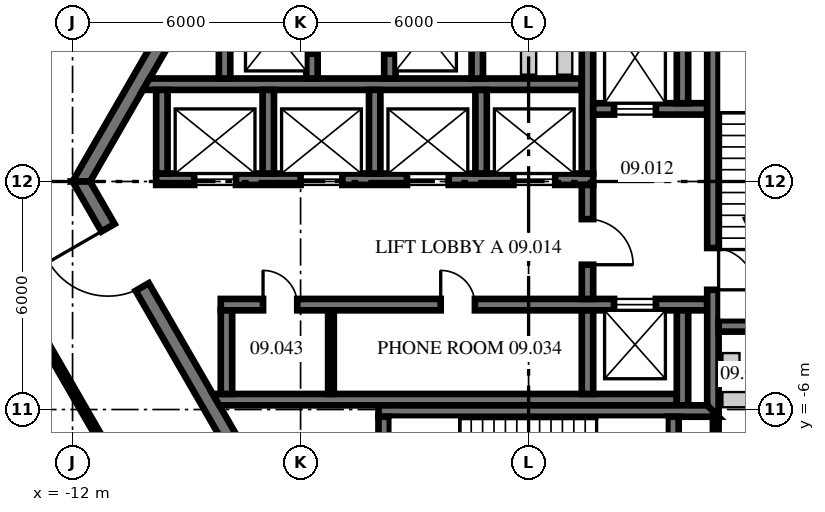
"""IFC4 building model, lengths in metres.
Left out: names, types, materials, properties, quantities, classifications, styles, units other than length and angle.
Written with IfcOpenShell. Run it as: python <this file> out.ifc"""

import sys

from ifc_helpers import new_model, si_unit, direction, frame, frame_2d, origin, place, context, subcontext, project, spatial, polyline, rectangle, outline, extrude, source, transform, mapped, element, fill, save


model = new_model("IFC4")
c1 = context("Model", 3, precision=1e-05, world=origin(), true_north=direction((0.0, 1.0)))
c2 = subcontext(c1, "Body", "Model", "MODEL_VIEW")
j1 = project(units=[si_unit("LENGTHUNIT", "METRE"), si_unit("PLANEANGLEUNIT", "RADIAN")], contexts=[c1])
p1 = place(None, origin())
s1 = spatial("IfcSite", under=j1, at=p1, CompositionType="ELEMENT")
p2 = place(p1, origin())
s2 = spatial("IfcBuilding", under=s1, at=p2, CompositionType="ELEMENT")
p3 = place(p2, frame((0.0, 0.0, 41.8)))
s3 = spatial("IfcBuildingStorey", under=s2, at=p3, CompositionType="ELEMENT", Elevation=41.8)
m1 = source(origin(), c2, "Body", "SweptSolid", [
    extrude(outline(polyline([(-0.115, -0.2), (11.885, -0.2), (11.654, 0.2), (0.115, 0.2), (-0.115, -0.2)])), origin(), (0.0, 0.0, 1.0), 4.1),
])
p4 = place(p3, frame((-5.885, 10.192, 0.0), z_axis=(0.0, 0.0, 1.0), x_axis=(-0.499996592174, -0.866027371285, 0.0)))
e1 = element("IfcWall", 1, at=p4, inside=s3, PredefinedType="SHEAR", context=c2, shape_type="MappedRepresentation", body=[
    mapped(m1, transform((0.0, 0.0, 0.0), scale=1.0)),
])
p5 = place(p4, frame((3.185, 0.0, 0.0)))
e2 = element("IfcOpeningElement", 2, at=p5, cuts=e1, PredefinedType="OPENING", context=c2, shape_type="SweptSolid", body=[
    extrude(rectangle(XDim=1.2, YDim=2.1, at=frame_2d((0.6, 1.05))), frame((0.0, 0.21, 0.0), z_axis=(0.0, -1.0, 0.0), x_axis=(1.0, 0.0, 0.0)), (0.0, 0.0, 1.0), 0.42),
])
p6 = place(p3, frame((-11.769, 0.0, 0.0), z_axis=(0.0, 0.0, 1.0), x_axis=(0.499996592174, -0.866027371285, 0.0)))
e3 = element("IfcWall", 3, at=p6, inside=s3, PredefinedType="SHEAR", context=c2, shape_type="MappedRepresentation", body=[
    mapped(m1, transform((0.0, 0.0, 0.0), scale=1.0)),
])
p7 = place(p6, frame((1.405, 0.0, 0.0)))
e4 = element("IfcOpeningElement", 4, at=p7, cuts=e3, PredefinedType="OPENING", context=c2, shape_type="SweptSolid", body=[
    extrude(rectangle(XDim=1.8, YDim=2.1, at=frame_2d((0.9, 1.05))), frame((0.0, 0.21, 0.0), z_axis=(0.0, -1.0, 0.0), x_axis=(1.0, 0.0, 0.0)), (0.0, 0.0, 1.0), 0.42),
])
p8 = place(p6, frame((7.915, 0.0, 0.0)))
e5 = element("IfcOpeningElement", 5, at=p8, cuts=e3, PredefinedType="OPENING", context=c2, shape_type="SweptSolid", body=[
    extrude(rectangle(XDim=1.2, YDim=2.1, at=frame_2d((0.6, 1.05))), frame((0.0, 0.21, 0.0), z_axis=(0.0, -1.0, 0.0), x_axis=(1.0, 0.0, 0.0)), (0.0, 0.0, 1.0), 0.42),
])
m2 = source(origin(), c2, "Body", "SweptSolid", [
    extrude(rectangle(XDim=11.5, YDim=0.3, at=frame_2d((5.75, 0.0))), origin(), (0.0, 0.0, 1.0), 4.1),
])
p9 = place(p3, frame((-9.8, 0.06, 0.0), z_axis=(0.0, 0.0, 1.0), x_axis=(1.0, 0.0, 0.0)))
e6 = element("IfcWall", 6, at=p9, inside=s3, PredefinedType="SHEAR", context=c2, shape_type="MappedRepresentation", body=[
    mapped(m2, transform((0.0, 0.0, 0.0), scale=1.0)),
])
p10 = place(p9, frame((1.0, 0.0, 0.0)))
e7 = element("IfcOpeningElement", 7, at=p10, cuts=e6, PredefinedType="OPENING", context=c2, shape_type="SweptSolid", body=[
    extrude(rectangle(XDim=1.1, YDim=2.1, at=frame_2d((0.55, 1.05))), frame((0.0, 0.16, 0.0), z_axis=(0.0, -1.0, 0.0), x_axis=(1.0, 0.0, 0.0)), (0.0, 0.0, 1.0), 0.32),
])
p11 = place(p9, frame((3.8, 0.0, 0.0)))
e8 = element("IfcOpeningElement", 8, at=p11, cuts=e6, PredefinedType="OPENING", context=c2, shape_type="SweptSolid", body=[
    extrude(rectangle(XDim=1.1, YDim=2.1, at=frame_2d((0.55, 1.05))), frame((0.0, 0.16, 0.0), z_axis=(0.0, -1.0, 0.0), x_axis=(1.0, 0.0, 0.0)), (0.0, 0.0, 1.0), 0.32),
])
p12 = place(p9, frame((6.6, 0.0, 0.0)))
e9 = element("IfcOpeningElement", 9, at=p12, cuts=e6, PredefinedType="OPENING", context=c2, shape_type="SweptSolid", body=[
    extrude(rectangle(XDim=1.1, YDim=2.1, at=frame_2d((0.55, 1.05))), frame((0.0, 0.16, 0.0), z_axis=(0.0, -1.0, 0.0), x_axis=(1.0, 0.0, 0.0)), (0.0, 0.0, 1.0), 0.32),
])
p13 = place(p9, frame((9.4, 0.0, 0.0)))
e10 = element("IfcOpeningElement", 10, at=p13, cuts=e6, PredefinedType="OPENING", context=c2, shape_type="SweptSolid", body=[
    extrude(rectangle(XDim=1.1, YDim=2.1, at=frame_2d((0.55, 1.05))), frame((0.0, 0.16, 0.0), z_axis=(0.0, -1.0, 0.0), x_axis=(1.0, 0.0, 0.0)), (0.0, 0.0, 1.0), 0.32),
])
m3 = source(origin(), c2, "Body", "SweptSolid", [
    extrude(outline(polyline([(11.2, -0.15), (-0.349, -0.15), (-0.176, 0.15), (11.2, 0.15), (11.2, -0.15)])), origin(), (0.0, 0.0, 1.0), 4.1),
])
p14 = place(p3, frame((-9.8, 2.56, 0.0), z_axis=(0.0, 0.0, 1.0), x_axis=(1.0, 0.0, 0.0)))
e11 = element("IfcWall", 11, at=p14, inside=s3, PredefinedType="SHEAR", context=c2, shape_type="MappedRepresentation", body=[
    mapped(m3, transform((0.0, 0.0, 0.0), scale=1.0)),
])
m4 = source(origin(), c2, "Body", "SweptSolid", [
    extrude(rectangle(XDim=4.45, YDim=0.3, at=frame_2d((2.225, 0.0))), origin(), (0.0, 0.0, 1.0), 4.1),
])
p15 = place(p3, frame((1.55, 0.21, 0.0), z_axis=(0.0, 0.0, 1.0), x_axis=(0.0, 1.0, 0.0)))
e12 = element("IfcWall", 12, at=p15, inside=s3, PredefinedType="SHEAR", context=c2, shape_type="MappedRepresentation", body=[
    mapped(m4, transform((0.0, 0.0, 0.0), scale=1.0)),
])
m5 = source(origin(), c2, "Body", "SweptSolid", [
    extrude(rectangle(XDim=3.0, YDim=0.3, at=frame_2d((1.5, 0.0))), origin(), (0.0, 0.0, 1.0), 4.1),
])
p16 = place(p3, frame((1.7, 1.91, 0.0), z_axis=(0.0, 0.0, 1.0), x_axis=(1.0, 0.0, 0.0)))
e13 = element("IfcWall", 13, at=p16, inside=s3, PredefinedType="SHEAR", context=c2, shape_type="MappedRepresentation", body=[
    mapped(m5, transform((0.0, 0.0, 0.0), scale=1.0)),
])
p17 = place(p16, frame((0.55, 0.0, 0.0)))
e14 = element("IfcOpeningElement", 14, at=p17, cuts=e13, PredefinedType="OPENING", context=c2, shape_type="SweptSolid", body=[
    extrude(rectangle(XDim=1.1, YDim=2.1, at=frame_2d((0.55, 1.05))), frame((0.0, 0.16, 0.0), z_axis=(0.0, -1.0, 0.0), x_axis=(1.0, 0.0, 0.0)), (0.0, 0.0, 1.0), 0.32),
])
m6 = source(origin(), c2, "Body", "SweptSolid", [
    extrude(rectangle(XDim=2.9, YDim=0.3, at=frame_2d((1.45, 0.0))), origin(), (0.0, 0.0, 1.0), 4.1),
])
p18 = place(p3, frame((4.05, 2.06, 0.0), z_axis=(0.0, 0.0, 1.0), x_axis=(0.0, 1.0, 0.0)))
e15 = element("IfcWall", 15, at=p18, inside=s3, PredefinedType="SHEAR", context=c2, shape_type="MappedRepresentation", body=[
    mapped(m6, transform((0.0, 0.0, 0.0), scale=1.0)),
])
m7 = source(origin(), c2, "Body", "SweptSolid", [
    extrude(rectangle(XDim=12.8, YDim=0.3, at=frame_2d((6.4, 0.0))), origin(), (0.0, 0.0, 1.0), 4.1),
])
p19 = place(p3, frame((-8.1, -3.24, 0.0), z_axis=(0.0, 0.0, 1.0), x_axis=(1.0, 0.0, 0.0)))
e16 = element("IfcWall", 16, at=p19, inside=s3, PredefinedType="SHEAR", context=c2, shape_type="MappedRepresentation", body=[
    mapped(m7, transform((0.0, 0.0, 0.0), scale=1.0)),
])
p20 = place(p19, frame((1.113, 0.0, 0.0)))
e17 = element("IfcOpeningElement", 17, at=p20, cuts=e16, PredefinedType="OPENING", context=c2, shape_type="SweptSolid", body=[
    extrude(rectangle(XDim=0.9, YDim=2.1, at=frame_2d((0.45, 1.05))), frame((0.0, 0.16, 0.0), z_axis=(0.0, -1.0, 0.0), x_axis=(1.0, 0.0, 0.0)), (0.0, 0.0, 1.0), 0.32),
])
p21 = place(p19, frame((5.788, 0.0, 0.0)))
e18 = element("IfcOpeningElement", 18, at=p21, cuts=e16, PredefinedType="OPENING", context=c2, shape_type="SweptSolid", body=[
    extrude(rectangle(XDim=0.9, YDim=2.1, at=frame_2d((0.45, 1.05))), frame((0.0, 0.16, 0.0), z_axis=(0.0, -1.0, 0.0), x_axis=(1.0, 0.0, 0.0)), (0.0, 0.0, 1.0), 0.32),
])
p22 = place(p19, frame((10.35, 0.0, 0.0)))
e19 = element("IfcOpeningElement", 19, at=p22, cuts=e16, PredefinedType="OPENING", context=c2, shape_type="SweptSolid", body=[
    extrude(rectangle(XDim=1.1, YDim=2.1, at=frame_2d((0.55, 1.05))), frame((0.0, 0.16, 0.0), z_axis=(0.0, -1.0, 0.0), x_axis=(1.0, 0.0, 0.0)), (0.0, 0.0, 1.0), 0.32),
])
m8 = source(origin(), c2, "Body", "SweptSolid", [
    extrude(outline(polyline([(12.0, -0.15), (-0.04, -0.15), (-0.213, 0.15), (12.0, 0.15), (12.0, -0.15)])), origin(), (0.0, 0.0, 1.0), 4.1),
])
p23 = place(p3, frame((-8.1, -5.74, 0.0), z_axis=(0.0, 0.0, 1.0), x_axis=(1.0, 0.0, 0.0)))
e20 = element("IfcWall", 20, at=p23, inside=s3, PredefinedType="SHEAR", context=c2, shape_type="MappedRepresentation", body=[
    mapped(m8, transform((0.0, 0.0, 0.0), scale=1.0)),
])
m9 = source(origin(), c2, "Body", "SweptSolid", [
    extrude(rectangle(XDim=2.2, YDim=0.3, at=frame_2d((1.1, 0.0))), origin(), (0.0, 0.0, 1.0), 4.1),
])
p24 = place(p3, frame((-7.95, -5.59, 0.0), z_axis=(0.0, 0.0, 1.0), x_axis=(0.0, 1.0, 0.0)))
e21 = element("IfcWall", 21, at=p24, inside=s3, PredefinedType="SHEAR", context=c2, shape_type="MappedRepresentation", body=[
    mapped(m9, transform((0.0, 0.0, 0.0), scale=1.0)),
])
m10 = source(origin(), c2, "Body", "SweptSolid", [
    extrude(rectangle(XDim=2.2, YDim=0.3, at=frame_2d((1.1, 0.0))), origin(), (0.0, 0.0, 1.0), 4.1),
])
p25 = place(p3, frame((-9.65, 0.21, 0.0), z_axis=(0.0, 0.0, 1.0), x_axis=(0.0, 1.0, 0.0)))
e22 = element("IfcWall", 22, at=p25, inside=s3, PredefinedType="SHEAR", context=c2, shape_type="MappedRepresentation", body=[
    mapped(m10, transform((0.0, 0.0, 0.0), scale=1.0)),
])
p26 = place(p3, frame((1.55, -5.59, 0.0), z_axis=(0.0, 0.0, 1.0), x_axis=(0.0, 1.0, 0.0)))
e23 = element("IfcWall", 23, at=p26, inside=s3, PredefinedType="SHEAR", context=c2, shape_type="MappedRepresentation", body=[
    mapped(m9, transform((0.0, 0.0, 0.0), scale=1.0)),
])
m11 = source(origin(), c2, "Body", "SweptSolid", [
    extrude(rectangle(XDim=2.5, YDim=0.3, at=frame_2d((1.25, 0.0))), origin(), (0.0, 0.0, 1.0), 4.1),
])
p27 = place(p3, frame((4.05, -5.89, 0.0), z_axis=(0.0, 0.0, 1.0), x_axis=(0.0, 1.0, 0.0)))
e24 = element("IfcWall", 24, at=p27, inside=s3, PredefinedType="SHEAR", context=c2, shape_type="MappedRepresentation", body=[
    mapped(m11, transform((0.0, 0.0, 0.0), scale=1.0)),
])
p28 = place(p3, frame((1.55, -3.09, 0.0), z_axis=(0.0, 0.0, 1.0), x_axis=(0.0, 1.0, 0.0)))
e25 = element("IfcWall", 25, at=p28, inside=s3, PredefinedType="SHEAR", context=c2, shape_type="MappedRepresentation", body=[
    mapped(m5, transform((0.0, 0.0, 0.0), scale=1.0)),
])
p29 = place(p28, frame((0.9, 0.0, 0.0)))
e26 = element("IfcOpeningElement", 26, at=p29, cuts=e25, PredefinedType="OPENING", context=c2, shape_type="SweptSolid", body=[
    extrude(rectangle(XDim=1.2, YDim=2.1, at=frame_2d((0.6, 1.05))), frame((0.0, 0.16, 0.0), z_axis=(0.0, -1.0, 0.0), x_axis=(1.0, 0.0, 0.0)), (0.0, 0.0, 1.0), 0.32),
])
m12 = source(origin(), c2, "Body", "SweptSolid", [
    extrude(outline(polyline([(-0.15, -0.15), (9.99, -0.15), (9.99, 0.15), (0.15, 0.15), (-0.15, -0.15)])), origin(), (0.0, 0.0, 1.0), 4.1),
])
p30 = place(p3, frame((4.85, -6.04, 0.0), z_axis=(0.0, 0.0, 1.0), x_axis=(0.0, 1.0, 0.0)))
e27 = element("IfcWall", 27, at=p30, inside=s3, PredefinedType="SHEAR", context=c2, shape_type="MappedRepresentation", body=[
    mapped(m12, transform((0.0, 0.0, 0.0), scale=1.0)),
])
p31 = place(p30, frame((3.19, 0.0, 0.0)))
e28 = element("IfcOpeningElement", 28, at=p31, cuts=e27, PredefinedType="OPENING", context=c2, shape_type="SweptSolid", body=[
    extrude(rectangle(XDim=1.1, YDim=2.1, at=frame_2d((0.55, 1.05))), frame((0.0, 0.16, 0.0), z_axis=(0.0, -1.0, 0.0), x_axis=(1.0, 0.0, 0.0)), (0.0, 0.0, 1.0), 0.32),
])
m13 = source(origin(), c2, "Body", "SweptSolid", [
    extrude(outline(polyline([(0.0, -0.15), (0.0, 0.15), (4.433, 0.15), (4.26, -0.15), (0.0, -0.15)])), origin(), (0.0, 0.0, 1.0), 4.1),
])
p32 = place(p3, frame((5.0, -3.8, 0.0), z_axis=(0.0, 0.0, 1.0), x_axis=(1.0, 0.0, 0.0)))
e29 = element("IfcWall", 29, at=p32, inside=s3, PredefinedType="SHEAR", context=c2, shape_type="MappedRepresentation", body=[
    mapped(m13, transform((0.0, 0.0, 0.0), scale=1.0)),
])
p33 = place(p32, frame((2.45, 0.0, 0.0)))
e30 = element("IfcOpeningElement", 30, at=p33, cuts=e29, PredefinedType="OPENING", context=c2, shape_type="SweptSolid", body=[
    extrude(rectangle(XDim=1.1, YDim=2.1, at=frame_2d((0.55, 1.05))), frame((0.0, 0.16, 0.0), z_axis=(0.0, -1.0, 0.0), x_axis=(1.0, 0.0, 0.0)), (0.0, 0.0, 1.0), 0.32),
])
m14 = source(origin(), c2, "Body", "SweptSolid", [
    extrude(outline(polyline([(0.0, -0.15), (8.95, -0.15), (8.65, 0.15), (0.0, 0.15), (0.0, -0.15)])), origin(), (0.0, 0.0, 1.0), 4.1),
])
p34 = place(p3, frame((-3.95, -6.04, 0.0), z_axis=(0.0, 0.0, 1.0), x_axis=(1.0, 0.0, 0.0)))
e31 = element("IfcWall", 31, at=p34, inside=s3, PredefinedType="SHEAR", context=c2, shape_type="MappedRepresentation", body=[
    mapped(m14, transform((0.0, 0.0, 0.0), scale=1.0)),
])
m15 = source(origin(), c2, "Body", "SweptSolid", [
    extrude(outline(polyline([(3.8, -0.15), (-0.004, -0.15), (-0.004, 0.15), (3.8, 0.15), (3.8, -0.15)])), origin(), (0.0, 0.0, 1.0), 4.1),
])
for number, where, z_axis, x_axis in (
    (32, (-3.8, -9.99, 0.0), (0.0, 0.0, 1.0), (0.0, 1.0, 0.0)),
    (33, (3.8, -9.99, 0.0), (0.0, 0.0, 1.0), (0.0, 1.0, 0.0)),
):
    element("IfcWall", number, at=place(p3, frame(where, z_axis=z_axis, x_axis=x_axis)), inside=s3, PredefinedType="SHEAR", context=c2, shape_type="MappedRepresentation", body=[
        mapped(m15, transform((0.0, 0.0, 0.0), scale=1.0)),
    ])
m16 = source(origin(), c2, "Body", "SweptSolid", [
    extrude(rectangle(XDim=2.4, YDim=0.3, at=frame_2d((1.2, 0.0))), origin(), (0.0, 0.0, 1.0), 4.1),
])
p35 = place(p3, frame((-8.0, 2.71, 0.0), z_axis=(0.0, 0.0, 1.0), x_axis=(0.0, 1.0, 0.0)))
e34 = element("IfcWall", 34, at=p35, inside=s3, PredefinedType="SHEAR", context=c2, shape_type="MappedRepresentation", body=[
    mapped(m16, transform((0.0, 0.0, 0.0), scale=1.0)),
])
p36 = place(p3, frame((-5.7, 2.71, 0.0), z_axis=(0.0, 0.0, 1.0), x_axis=(0.0, 1.0, 0.0)))
e35 = element("IfcWall", 35, at=p36, inside=s3, PredefinedType="SHEAR", context=c2, shape_type="MappedRepresentation", body=[
    mapped(m16, transform((0.0, 0.0, 0.0), scale=1.0)),
])
p37 = place(p36, frame((0.65, 0.0, 0.0)))
e36 = element("IfcOpeningElement", 36, at=p37, cuts=e35, PredefinedType="OPENING", context=c2, shape_type="SweptSolid", body=[
    extrude(rectangle(XDim=1.1, YDim=2.1, at=frame_2d((0.55, 1.05))), frame((0.0, 0.16, 0.0), z_axis=(0.0, -1.0, 0.0), x_axis=(1.0, 0.0, 0.0)), (0.0, 0.0, 1.0), 0.32),
])
p38 = place(p3, frame((-3.65, 2.71, 0.0), z_axis=(0.0, 0.0, 1.0), x_axis=(0.0, 1.0, 0.0)))
e37 = element("IfcWall", 37, at=p38, inside=s3, PredefinedType="SHEAR", context=c2, shape_type="MappedRepresentation", body=[
    mapped(m16, transform((0.0, 0.0, 0.0), scale=1.0)),
])
p39 = place(p38, frame((0.65, 0.0, 0.0)))
e38 = element("IfcOpeningElement", 38, at=p39, cuts=e37, PredefinedType="OPENING", context=c2, shape_type="SweptSolid", body=[
    extrude(rectangle(XDim=1.1, YDim=2.1, at=frame_2d((0.55, 1.05))), frame((0.0, 0.16, 0.0), z_axis=(0.0, -1.0, 0.0), x_axis=(1.0, 0.0, 0.0)), (0.0, 0.0, 1.0), 0.32),
])
p40 = place(p3, frame((-1.35, 2.71, 0.0), z_axis=(0.0, 0.0, 1.0), x_axis=(0.0, 1.0, 0.0)))
e39 = element("IfcWall", 39, at=p40, inside=s3, PredefinedType="SHEAR", context=c2, shape_type="MappedRepresentation", body=[
    mapped(m16, transform((0.0, 0.0, 0.0), scale=1.0)),
])
for number, where, z_axis, x_axis in (
    (40, (-6.85, 0.21, 0.0), (0.0, 0.0, 1.0), (0.0, 1.0, 0.0)),
    (41, (-4.05, 0.21, 0.0), (0.0, 0.0, 1.0), (0.0, 1.0, 0.0)),
    (42, (-1.25, 0.21, 0.0), (0.0, 0.0, 1.0), (0.0, 1.0, 0.0)),
):
    element("IfcWall", number, at=place(p3, frame(where, z_axis=z_axis, x_axis=x_axis)), inside=s3, PredefinedType="SHEAR", context=c2, shape_type="MappedRepresentation", body=[
        mapped(m10, transform((0.0, 0.0, 0.0), scale=1.0)),
    ])
m17 = source(origin(), c2, "Body", "SweptSolid", [
    extrude(rectangle(XDim=2.2, YDim=0.15, at=frame_2d((1.1, 0.0))), origin(), (0.0, 0.0, 1.0), 4.1),
])
p41 = place(p3, frame((-5.2, -5.59, 0.0), z_axis=(0.0, 0.0, 1.0), x_axis=(0.0, 1.0, 0.0)))
e43 = element("IfcWall", 43, at=p41, inside=s3, PredefinedType="PARTITIONING", context=c2, shape_type="MappedRepresentation", body=[
    mapped(m17, transform((0.0, 0.0, 0.0), scale=1.0)),
])
m18 = source(origin(), c2, "Body", "SweptSolid", [
    extrude(rectangle(XDim=1.885, YDim=0.15, at=frame_2d((0.942, 0.0))), origin(), (0.0, 0.0, 1.0), 4.1),
])
p42 = place(p3, frame((4.925, -8.075, 0.0), z_axis=(0.0, 0.0, 1.0), x_axis=(0.0, 1.0, 0.0)))
e44 = element("IfcWall", 44, at=p42, inside=s3, PredefinedType="PARTITIONING", context=c2, shape_type="MappedRepresentation", body=[
    mapped(m18, transform((0.0, 0.0, 0.0), scale=1.0)),
])
p43 = place(p3, frame((-12.665, -4.348, 0.0), z_axis=(0.0, 0.0, 1.0), x_axis=(0.500009333805, -0.866020014843, 0.0)))
e45 = element("IfcWall", 45, at=p43, inside=s3, PredefinedType="PARTITIONING", context=c2, shape_type="SweptSolid", body=[
    extrude(rectangle(XDim=3.806, YDim=0.15, at=frame_2d((1.903, 0.0))), origin(), (0.0, 0.0, 1.0), 4.1),
])
p44 = place(p3, frame((-15.175, 0.0, 0.0), z_axis=(0.0, 0.0, 1.0), x_axis=(0.499999423938, 0.866025736374, 0.0)))
e46 = element("IfcWall", 46, at=p44, inside=s3, PredefinedType="PARTITIONING", context=c2, shape_type="SweptSolid", body=[
    extrude(rectangle(XDim=8.876, YDim=0.15, at=frame_2d((4.438, 0.0))), origin(), (0.0, 0.0, 1.0), 4.1),
])
p45 = place(p44, frame((2.037, 0.0, 0.0)))
e47 = element("IfcOpeningElement", 47, at=p45, cuts=e46, PredefinedType="OPENING", context=c2, shape_type="SweptSolid", body=[
    extrude(rectangle(XDim=0.9, YDim=2.1, at=frame_2d((0.45, 1.05))), frame((0.0, 0.085, 0.0), z_axis=(0.0, -1.0, 0.0), x_axis=(1.0, 0.0, 0.0)), (0.0, 0.0, 1.0), 0.17),
])
p46 = place(p7, frame((1.8, 0.0, 0.0), z_axis=(0.0, 0.0, 1.0), x_axis=(-1.0, 0.0, 0.0)))
e48 = element("IfcDoor", 48, at=p46, inside=s3, OperationType="DOUBLE_DOOR_DOUBLE_SWING", PredefinedType="DOOR", context=c2, shape_type="SweptSolid", body=[
    extrude(rectangle(XDim=1.8, YDim=2.1, at=frame_2d((0.9, 1.05))), frame((0.0, 0.025, 0.0), z_axis=(0.0, -1.0, 0.0), x_axis=(1.0, 0.0, 0.0)), (0.0, 0.0, 1.0), 0.05),
])
fill(e4, e48)
p47 = place(p31, frame((1.1, 0.0, 0.0), z_axis=(0.0, 0.0, 1.0), x_axis=(-1.0, 0.0, 0.0)))
e49 = element("IfcDoor", 49, at=p47, inside=s3, OperationType="SINGLE_SWING_RIGHT", PredefinedType="DOOR", context=c2, shape_type="SweptSolid", body=[
    extrude(rectangle(XDim=1.1, YDim=2.1, at=frame_2d((0.55, 1.05))), frame((0.0, 0.025, 0.0), z_axis=(0.0, -1.0, 0.0), x_axis=(1.0, 0.0, 0.0)), (0.0, 0.0, 1.0), 0.05),
])
fill(e28, e49)
p48 = place(p29, frame((1.2, 0.0, 0.0), z_axis=(0.0, 0.0, 1.0), x_axis=(-1.0, 0.0, 0.0)))
e50 = element("IfcDoor", 50, at=p48, inside=s3, OperationType="SINGLE_SWING_RIGHT", PredefinedType="DOOR", context=c2, shape_type="SweptSolid", body=[
    extrude(rectangle(XDim=1.2, YDim=2.1, at=frame_2d((0.6, 1.05))), frame((0.0, 0.025, 0.0), z_axis=(0.0, -1.0, 0.0), x_axis=(1.0, 0.0, 0.0)), (0.0, 0.0, 1.0), 0.05),
])
fill(e26, e50)
p49 = place(p20, origin())
e51 = element("IfcDoor", 51, at=p49, inside=s3, OperationType="SINGLE_SWING_LEFT", PredefinedType="DOOR", context=c2, shape_type="SweptSolid", body=[
    extrude(rectangle(XDim=0.9, YDim=2.1, at=frame_2d((0.45, 1.05))), frame((0.0, 0.025, 0.0), z_axis=(0.0, -1.0, 0.0), x_axis=(1.0, 0.0, 0.0)), (0.0, 0.0, 1.0), 0.05),
])
fill(e17, e51)
p50 = place(p21, origin())
e52 = element("IfcDoor", 52, at=p50, inside=s3, OperationType="SINGLE_SWING_LEFT", PredefinedType="DOOR", context=c2, shape_type="SweptSolid", body=[
    extrude(rectangle(XDim=0.9, YDim=2.1, at=frame_2d((0.45, 1.05))), frame((0.0, 0.025, 0.0), z_axis=(0.0, -1.0, 0.0), x_axis=(1.0, 0.0, 0.0)), (0.0, 0.0, 1.0), 0.05),
])
fill(e18, e52)
p51 = place(p10, origin())
e53 = element("IfcDoor", 53, at=p51, inside=s3, OperationType="DOUBLE_DOOR_SLIDING", PredefinedType="DOOR", context=c2, shape_type="SweptSolid", body=[
    extrude(rectangle(XDim=1.1, YDim=2.1, at=frame_2d((0.55, 1.05))), frame((0.0, 0.025, 0.0), z_axis=(0.0, -1.0, 0.0), x_axis=(1.0, 0.0, 0.0)), (0.0, 0.0, 1.0), 0.05),
])
fill(e7, e53)
p52 = place(p11, origin())
e54 = element("IfcDoor", 54, at=p52, inside=s3, OperationType="DOUBLE_DOOR_SLIDING", PredefinedType="DOOR", context=c2, shape_type="SweptSolid", body=[
    extrude(rectangle(XDim=1.1, YDim=2.1, at=frame_2d((0.55, 1.05))), frame((0.0, 0.025, 0.0), z_axis=(0.0, -1.0, 0.0), x_axis=(1.0, 0.0, 0.0)), (0.0, 0.0, 1.0), 0.05),
])
fill(e8, e54)
p53 = place(p12, origin())
e55 = element("IfcDoor", 55, at=p53, inside=s3, OperationType="DOUBLE_DOOR_SLIDING", PredefinedType="DOOR", context=c2, shape_type="SweptSolid", body=[
    extrude(rectangle(XDim=1.1, YDim=2.1, at=frame_2d((0.55, 1.05))), frame((0.0, 0.025, 0.0), z_axis=(0.0, -1.0, 0.0), x_axis=(1.0, 0.0, 0.0)), (0.0, 0.0, 1.0), 0.05),
])
fill(e9, e55)
p54 = place(p13, origin())
e56 = element("IfcDoor", 56, at=p54, inside=s3, OperationType="DOUBLE_DOOR_SLIDING", PredefinedType="DOOR", context=c2, shape_type="SweptSolid", body=[
    extrude(rectangle(XDim=1.1, YDim=2.1, at=frame_2d((0.55, 1.05))), frame((0.0, 0.025, 0.0), z_axis=(0.0, -1.0, 0.0), x_axis=(1.0, 0.0, 0.0)), (0.0, 0.0, 1.0), 0.05),
])
fill(e10, e56)
p55 = place(p17, origin())
e57 = element("IfcDoor", 57, at=p55, inside=s3, OperationType="DOUBLE_DOOR_SLIDING", PredefinedType="DOOR", context=c2, shape_type="SweptSolid", body=[
    extrude(rectangle(XDim=1.1, YDim=2.1, at=frame_2d((0.55, 1.05))), frame((0.0, 0.025, 0.0), z_axis=(0.0, -1.0, 0.0), x_axis=(1.0, 0.0, 0.0)), (0.0, 0.0, 1.0), 0.05),
])
fill(e14, e57)
p56 = place(p22, origin())
e58 = element("IfcDoor", 58, at=p56, inside=s3, OperationType="DOUBLE_DOOR_SLIDING", PredefinedType="DOOR", context=c2, shape_type="SweptSolid", body=[
    extrude(rectangle(XDim=1.1, YDim=2.1, at=frame_2d((0.55, 1.05))), frame((0.0, 0.025, 0.0), z_axis=(0.0, -1.0, 0.0), x_axis=(1.0, 0.0, 0.0)), (0.0, 0.0, 1.0), 0.05),
])
fill(e19, e58)
p57 = place(p37, origin())
e59 = element("IfcDoor", 59, at=p57, inside=s3, OperationType="DOUBLE_DOOR_SLIDING", PredefinedType="DOOR", context=c2, shape_type="SweptSolid", body=[
    extrude(rectangle(XDim=1.1, YDim=2.1, at=frame_2d((0.55, 1.05))), frame((0.0, 0.025, 0.0), z_axis=(0.0, -1.0, 0.0), x_axis=(1.0, 0.0, 0.0)), (0.0, 0.0, 1.0), 0.05),
])
fill(e36, e59)
p58 = place(p39, origin())
e60 = element("IfcDoor", 60, at=p58, inside=s3, OperationType="DOUBLE_DOOR_SLIDING", PredefinedType="DOOR", context=c2, shape_type="SweptSolid", body=[
    extrude(rectangle(XDim=1.1, YDim=2.1, at=frame_2d((0.55, 1.05))), frame((0.0, 0.025, 0.0), z_axis=(0.0, -1.0, 0.0), x_axis=(1.0, 0.0, 0.0)), (0.0, 0.0, 1.0), 0.05),
])
fill(e38, e60)
save(model, sys.argv[1])
